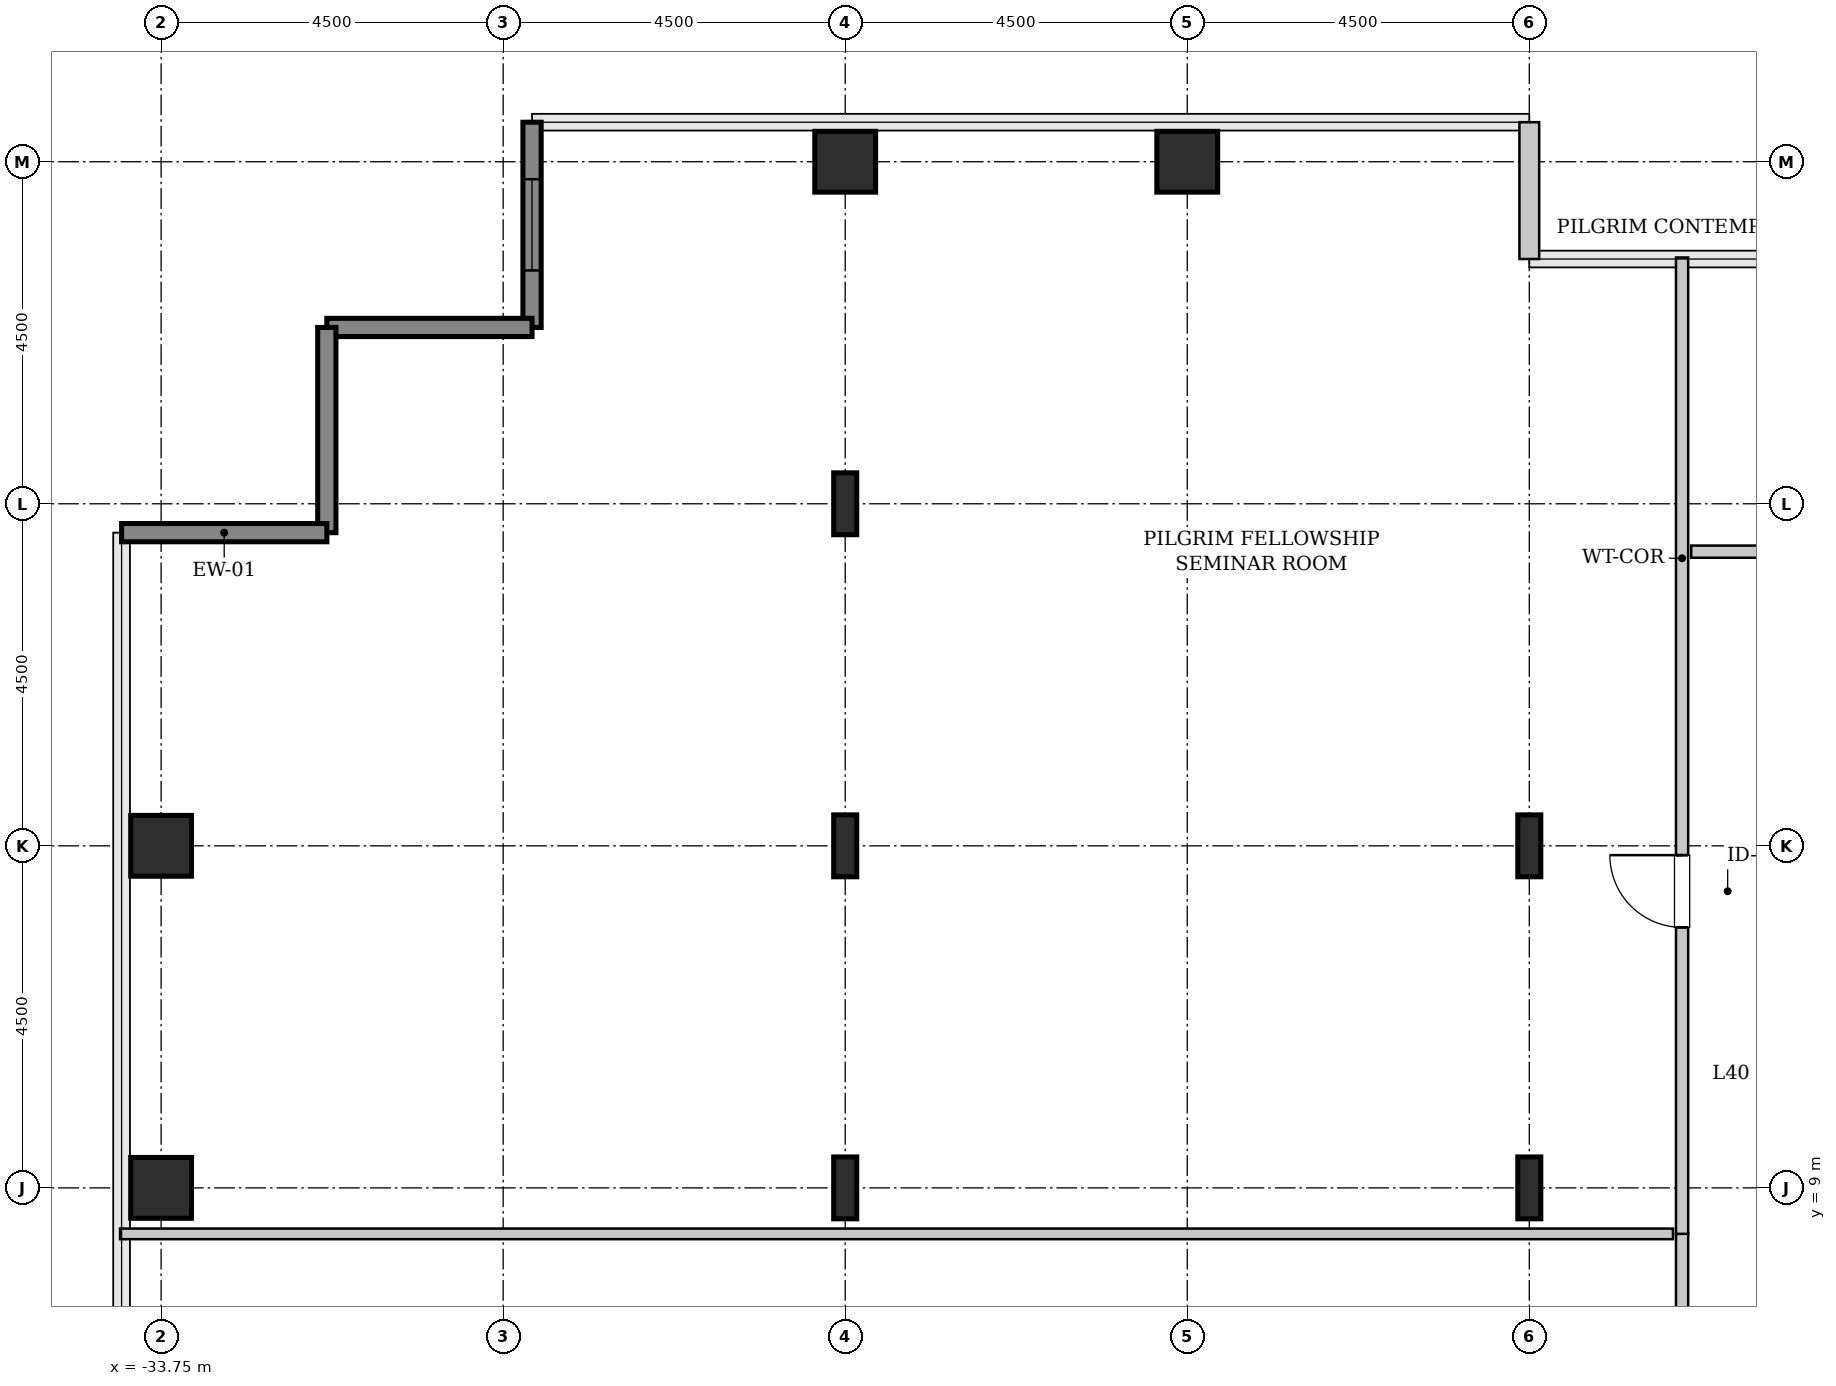
"""IFC4 building model, lengths in metres.
Left out: names, types, materials, properties, quantities, classifications, styles, units other than length and angle.
Written with IfcOpenShell. Run it as: python <this file> out.ifc"""

import sys

from ifc_helpers import new_model, si_unit, direction, frame, frame_2d, origin, origin_2d, place, context, subcontext, project, spatial, rectangle, hollow_rectangle, i_section, extrude, source, transform, mapped, element, fill, save


model = new_model("IFC4")
c1 = context("Model", 3, precision=1e-05, world=origin(), true_north=direction((0.0, 1.0)))
c2 = subcontext(c1, "Body", "Model", "MODEL_VIEW")
j1 = project(units=[si_unit("LENGTHUNIT", "METRE"), si_unit("PLANEANGLEUNIT", "RADIAN")], contexts=[c1])
p1 = place(None, origin())
s1 = spatial("IfcSite", under=j1, at=p1, CompositionType="ELEMENT")
p2 = place(p1, origin())
s2 = spatial("IfcBuilding", under=s1, at=p2, CompositionType="ELEMENT")
p3 = place(p2, frame((0.0, 0.0, 164.0)))
s3 = spatial("IfcBuildingStorey", under=s2, at=p3, CompositionType="ELEMENT", Elevation=164.0)
m1 = source(origin(), c2, "Body", "SweptSolid", [
    extrude(hollow_rectangle(XDim=0.8, YDim=0.8, WallThickness=0.04, InnerFilletRadius=0.04, OuterFilletRadius=0.08, at=origin_2d()), origin(), (0.0, 0.0, 1.0), 3.8),
])
for number, where, z_axis, x_axis in (
    (1, (-33.75, 9.0, 0.0), (0.0, 0.0, 1.0), (1.0, 0.0, 0.0)),
    (2, (-33.75, 13.5, 0.0), (0.0, 0.0, 1.0), (1.0, 0.0, 0.0)),
):
    element("IfcColumn", number, at=place(p3, frame(where, z_axis=z_axis, x_axis=x_axis)), inside=s3, PredefinedType="COLUMN", context=c2, shape_type="MappedRepresentation", body=[
        mapped(m1, transform((0.0, 0.0, 0.0), x_axis=(1.0, 0.0, 0.0), y_axis=(0.0, 1.0, 0.0), z_axis=(0.0, 0.0, 1.0), scale=1.0)),
    ])
m2 = source(origin(), c2, "Body", "SweptSolid", [
    extrude(i_section(OverallWidth=0.303, OverallDepth=0.814, WebThickness=0.021, FlangeThickness=0.04, FilletRadius=0.03, at=origin_2d()), origin(), (0.0, 0.0, 1.0), 3.8),
])
for number, where, z_axis, x_axis in (
    (3, (-24.75, 9.0, 0.0), (0.0, 0.0, 1.0), (1.0, 0.0, 0.0)),
    (4, (-24.75, 13.5, 0.0), (0.0, 0.0, 1.0), (1.0, 0.0, 0.0)),
    (5, (-24.75, 18.0, 0.0), (0.0, 0.0, 1.0), (1.0, 0.0, 0.0)),
):
    element("IfcColumn", number, at=place(p3, frame(where, z_axis=z_axis, x_axis=x_axis)), inside=s3, PredefinedType="COLUMN", context=c2, shape_type="MappedRepresentation", body=[
        mapped(m2, transform((0.0, 0.0, 0.0), x_axis=(1.0, 0.0, 0.0), y_axis=(0.0, 1.0, 0.0), z_axis=(0.0, 0.0, 1.0), scale=1.0)),
    ])
for number, where, z_axis, x_axis in (
    (6, (-24.75, 22.5, 0.0), (0.0, 0.0, 1.0), (1.0, 0.0, 0.0)),
    (7, (-20.25, 22.5, 0.0), (0.0, 0.0, 1.0), (1.0, 0.0, 0.0)),
):
    element("IfcColumn", number, at=place(p3, frame(where, z_axis=z_axis, x_axis=x_axis)), inside=s3, PredefinedType="COLUMN", context=c2, shape_type="MappedRepresentation", body=[
        mapped(m1, transform((0.0, 0.0, 0.0), x_axis=(1.0, 0.0, 0.0), y_axis=(0.0, 1.0, 0.0), z_axis=(0.0, 0.0, 1.0), scale=1.0)),
    ])
for number, where, z_axis, x_axis in (
    (8, (-15.75, 9.0, 0.0), (0.0, 0.0, 1.0), (1.0, 0.0, 0.0)),
    (9, (-15.75, 13.5, 0.0), (0.0, 0.0, 1.0), (1.0, 0.0, 0.0)),
):
    element("IfcColumn", number, at=place(p3, frame(where, z_axis=z_axis, x_axis=x_axis)), inside=s3, PredefinedType="COLUMN", context=c2, shape_type="MappedRepresentation", body=[
        mapped(m2, transform((0.0, 0.0, 0.0), x_axis=(1.0, 0.0, 0.0), y_axis=(0.0, 1.0, 0.0), z_axis=(0.0, 0.0, 1.0), scale=1.0)),
    ])
m3 = source(origin(), c2, "Body", "SweptSolid", [
    extrude(rectangle(XDim=1.8, YDim=0.26, at=frame_2d((0.9, 0.0))), origin(), (0.0, 0.0, 1.0), 3.55),
])
p4 = place(p3, frame((-15.75, 21.22, 0.0), z_axis=(0.0, 0.0, 1.0), x_axis=(0.0, 1.0, 0.0)))
e10 = element("IfcWall", 10, at=p4, inside=s3, PredefinedType="SOLIDWALL", context=c2, shape_type="MappedRepresentation", body=[
    mapped(m3, transform((0.0, 0.0, 0.0), x_axis=(1.0, 0.0, 0.0), y_axis=(0.0, 1.0, 0.0), z_axis=(0.0, 0.0, 1.0), scale=1.0)),
])
m4 = source(origin(), c2, "Body", "SweptSolid", [
    extrude(rectangle(XDim=2.7, YDim=0.24, at=frame_2d((1.35, 0.0))), origin(), (0.0, 0.0, 1.0), 3.55),
])
p5 = place(p3, frame((-28.87, 23.02, 0.0), z_axis=(0.0, 0.0, 1.0), x_axis=(0.0, -1.0, 0.0)))
e11 = element("IfcWall", 11, at=p5, inside=s3, PredefinedType="SHEAR", context=c2, shape_type="MappedRepresentation", body=[
    mapped(m4, transform((0.0, 0.0, 0.0), x_axis=(1.0, 0.0, 0.0), y_axis=(0.0, 1.0, 0.0), z_axis=(0.0, 0.0, 1.0), scale=1.0)),
])
p6 = place(p5, frame((0.75, 0.0, 0.85)))
e12 = element("IfcOpeningElement", 12, at=p6, cuts=e11, PredefinedType="OPENING", context=c2, shape_type="SweptSolid", body=[
    extrude(rectangle(XDim=1.2, YDim=1.8, at=frame_2d((0.6, 0.9))), frame((0.0, 0.13, 0.0), z_axis=(0.0, -1.0, 0.0), x_axis=(1.0, 0.0, 0.0)), (0.0, 0.0, 1.0), 0.26),
])
for number, where, z_axis, x_axis in (
    (13, (-28.87, 20.32, 0.0), (0.0, 0.0, 1.0), (-1.0, 0.0, 0.0)),
    (14, (-31.57, 20.32, 0.0), (0.0, 0.0, 1.0), (0.0, -1.0, 0.0)),
    (15, (-31.57, 17.62, 0.0), (0.0, 0.0, 1.0), (-1.0, 0.0, 0.0)),
):
    element("IfcWall", number, at=place(p3, frame(where, z_axis=z_axis, x_axis=x_axis)), inside=s3, PredefinedType="SHEAR", context=c2, shape_type="MappedRepresentation", body=[
        mapped(m4, transform((0.0, 0.0, 0.0), x_axis=(1.0, 0.0, 0.0), y_axis=(0.0, 1.0, 0.0), z_axis=(0.0, 0.0, 1.0), scale=1.0)),
    ])
m5 = source(origin(), c2, "Body", "SweptSolid", [
    extrude(rectangle(XDim=3.61, YDim=0.16, at=frame_2d((1.805, 0.0))), origin(), (0.0, 0.0, 1.0), 3.535),
])
p7 = place(p3, frame((-13.74, 4.795, 0.0), z_axis=(0.0, 0.0, 1.0), x_axis=(0.0, 1.0, 0.0)))
e16 = element("IfcWall", 16, at=p7, inside=s3, PredefinedType="PARTITIONING", context=c2, shape_type="MappedRepresentation", body=[
    mapped(m5, transform((0.0, 0.0, 0.0), x_axis=(1.0, 0.0, 0.0), y_axis=(0.0, 1.0, 0.0), z_axis=(0.0, 0.0, 1.0), scale=1.0)),
])
p8 = place(p7, frame((1.33, 0.0, 0.0)))
e17 = element("IfcOpeningElement", 17, at=p8, cuts=e16, PredefinedType="OPENING", context=c2, shape_type="SweptSolid", body=[
    extrude(rectangle(XDim=0.95, YDim=2.1, at=frame_2d((0.475, 1.05))), frame((0.0, 0.09, 0.0), z_axis=(0.0, -1.0, 0.0), x_axis=(1.0, 0.0, 0.0)), (0.0, 0.0, 1.0), 0.18),
])
m6 = source(origin(), c2, "Body", "SweptSolid", [
    extrude(rectangle(XDim=20.43, YDim=0.14, at=frame_2d((10.215, 0.0))), origin(), (0.0, 0.0, 1.0), 3.535),
])
p9 = place(p3, frame((-34.29, 8.395, 0.0), z_axis=(0.0, 0.0, 1.0), x_axis=(1.0, 0.0, 0.0)))
e18 = element("IfcWall", 18, at=p9, inside=s3, PredefinedType="PARTITIONING", context=c2, shape_type="MappedRepresentation", body=[
    mapped(m6, transform((0.0, 0.0, 0.0), x_axis=(1.0, 0.0, 0.0), y_axis=(0.0, 1.0, 0.0), z_axis=(0.0, 0.0, 1.0), scale=1.0)),
])
m7 = source(origin(), c2, "Body", "SweptSolid", [
    extrude(rectangle(XDim=12.845, YDim=0.16, at=frame_2d((6.422, 0.0))), origin(), (0.0, 0.0, 1.0), 3.535),
])
p10 = place(p3, frame((-13.74, 8.395, 0.0), z_axis=(0.0, 0.0, 1.0), x_axis=(0.0, 1.0, 0.0)))
e19 = element("IfcWall", 19, at=p10, inside=s3, PredefinedType="PARTITIONING", context=c2, shape_type="MappedRepresentation", body=[
    mapped(m7, transform((0.0, 0.0, 0.0), x_axis=(1.0, 0.0, 0.0), y_axis=(0.0, 1.0, 0.0), z_axis=(0.0, 0.0, 1.0), scale=1.0)),
])
p11 = place(p10, frame((4.032, 0.0, 0.0)))
e20 = element("IfcOpeningElement", 20, at=p11, cuts=e19, PredefinedType="OPENING", context=c2, shape_type="SweptSolid", body=[
    extrude(rectangle(XDim=0.95, YDim=2.1, at=frame_2d((0.475, 1.05))), frame((0.0, 0.09, 0.0), z_axis=(0.0, -1.0, 0.0), x_axis=(1.0, 0.0, 0.0)), (0.0, 0.0, 1.0), 0.18),
])
m8 = source(origin(), c2, "Body", "SweptSolid", [
    extrude(rectangle(XDim=4.16, YDim=0.16, at=frame_2d((2.08, 0.0))), origin(), (0.0, 0.0, 1.0), 3.535),
])
p12 = place(p3, frame((-13.62, 17.37, 0.0), z_axis=(0.0, 0.0, 1.0), x_axis=(1.0, 0.0, 0.0)))
e21 = element("IfcWall", 21, at=p12, inside=s3, PredefinedType="PARTITIONING", context=c2, shape_type="MappedRepresentation", body=[
    mapped(m8, transform((0.0, 0.0, 0.0), x_axis=(1.0, 0.0, 0.0), y_axis=(0.0, 1.0, 0.0), z_axis=(0.0, 0.0, 1.0), scale=1.0)),
])
p13 = place(p12, frame((0.969, 0.0, 0.0)))
e22 = element("IfcOpeningElement", 22, at=p13, cuts=e21, PredefinedType="OPENING", context=c2, shape_type="SweptSolid", body=[
    extrude(rectangle(XDim=0.95, YDim=2.1, at=frame_2d((0.475, 1.05))), frame((0.0, 0.09, 0.0), z_axis=(0.0, -1.0, 0.0), x_axis=(1.0, 0.0, 0.0)), (0.0, 0.0, 1.0), 0.18),
])
m9 = source(origin(), c2, "Body", "SweptSolid", [
    extrude(rectangle(XDim=1.2, YDim=1.8, at=frame_2d((0.6, 0.9))), frame((0.0, 0.03, 0.0), z_axis=(0.0, -1.0, 0.0), x_axis=(1.0, 0.0, 0.0)), (0.0, 0.0, 1.0), 0.06),
])
p14 = place(p6, origin())
e23 = element("IfcWindow", 23, at=p14, inside=s3, PartitioningType="SINGLE_PANEL", PredefinedType="WINDOW", context=c2, shape_type="MappedRepresentation", body=[
    mapped(m9, transform((0.0, 0.0, 0.0), x_axis=(1.0, 0.0, 0.0), y_axis=(0.0, 1.0, 0.0), z_axis=(0.0, 0.0, 1.0), scale=1.0)),
])
fill(e12, e23)
m10 = source(origin(), c2, "Body", "SweptSolid", [
    extrude(rectangle(XDim=0.95, YDim=2.1, at=frame_2d((0.475, 1.05))), frame((0.0, 0.025, 0.0), z_axis=(0.0, -1.0, 0.0), x_axis=(1.0, 0.0, 0.0)), (0.0, 0.0, 1.0), 0.05),
])
p15 = place(p11, origin())
e24 = element("IfcDoor", 24, at=p15, inside=s3, OperationType="SINGLE_SWING_RIGHT", PredefinedType="DOOR", context=c2, shape_type="MappedRepresentation", body=[
    mapped(m10, transform((0.0, 0.0, 0.0), x_axis=(1.0, 0.0, 0.0), y_axis=(0.0, 1.0, 0.0), z_axis=(0.0, 0.0, 1.0), scale=1.0)),
])
fill(e20, e24)
save(model, sys.argv[1])
